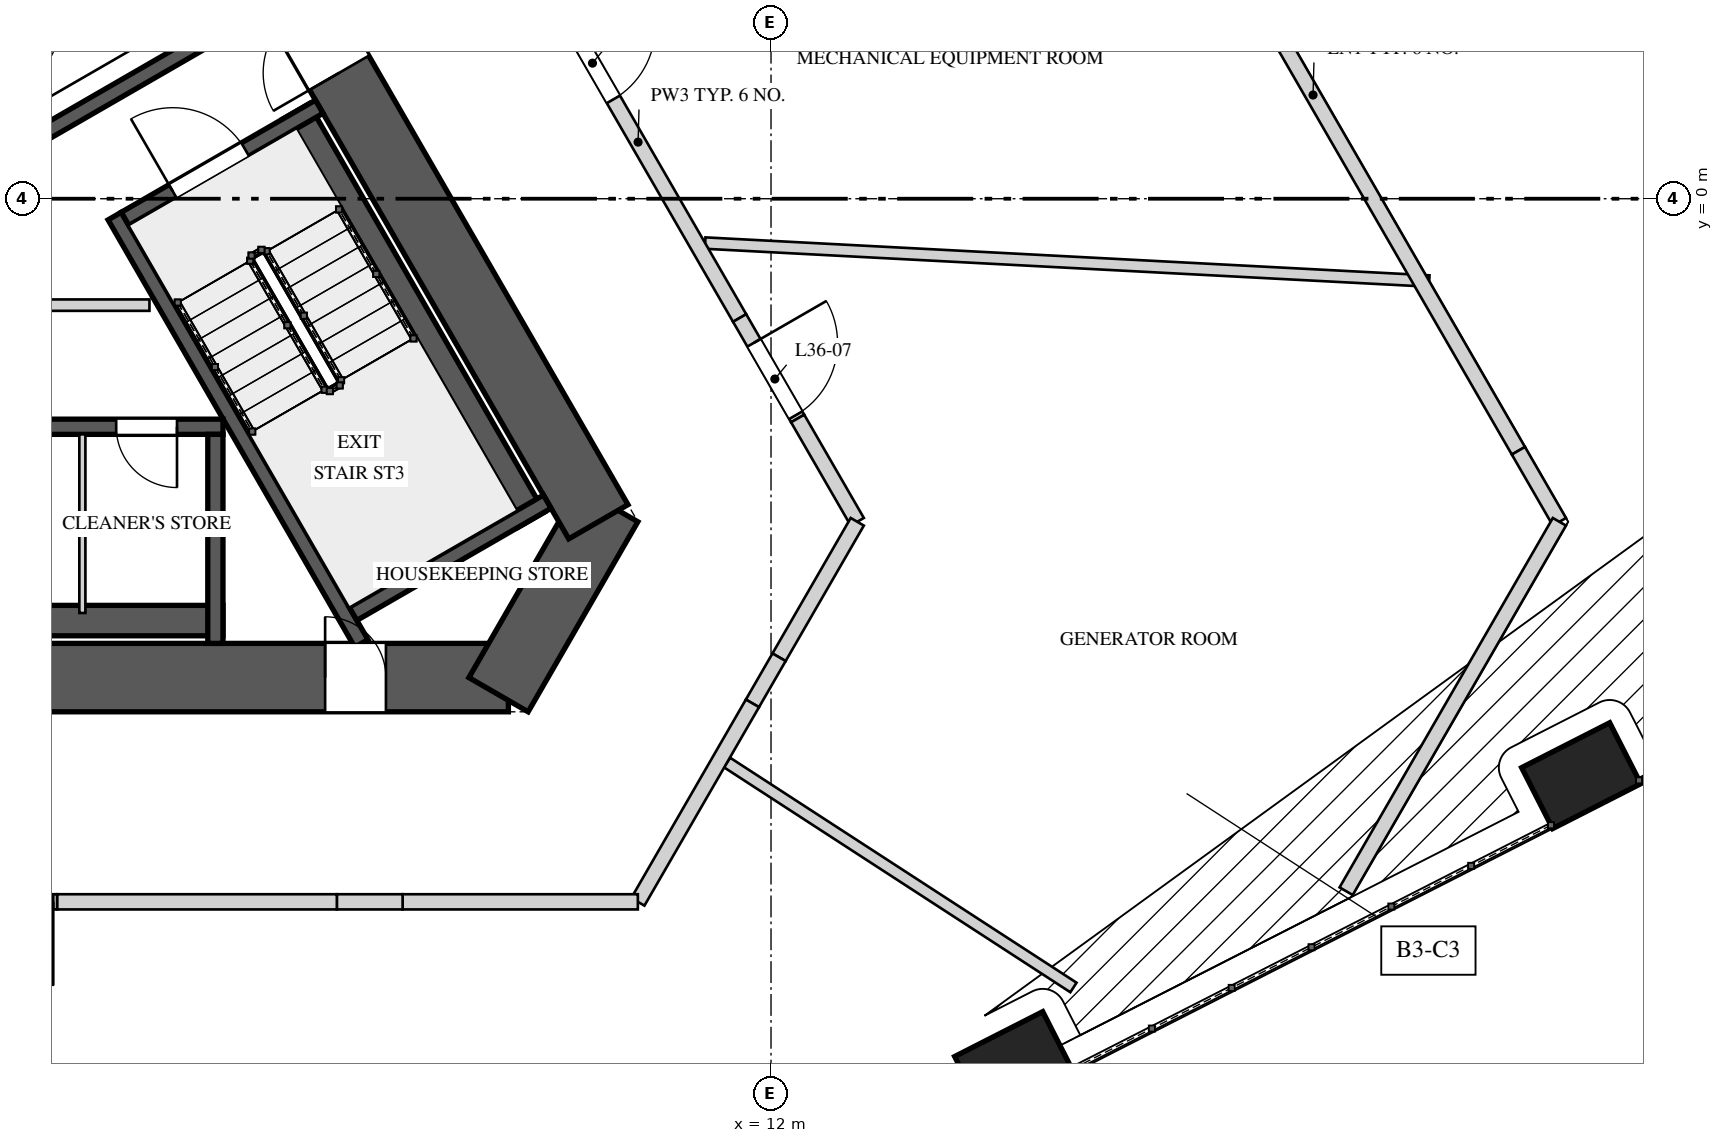
"""IFC4 building model, lengths in metres.
Left out: names, types, materials, properties, quantities, classifications, styles, units other than length and angle.
Written with IfcOpenShell. Run it as: python <this file> out.ifc"""

import sys

from ifc_helpers import new_model, si_unit, direction, frame, frame_2d, origin, origin_2d, place, context, subcontext, project, spatial, polyline, rectangle, outline, extrude, element, fill, save


model = new_model("IFC4")
c1 = context("Model", 3, precision=1e-05, world=origin(), true_north=direction((0.0, 1.0)))
c2 = subcontext(c1, "Body", "Model", "MODEL_VIEW")
j1 = project(units=[si_unit("LENGTHUNIT", "METRE"), si_unit("PLANEANGLEUNIT", "RADIAN")], contexts=[c1])
p1 = place(None, origin())
s1 = spatial("IfcSite", under=j1, at=p1, CompositionType="ELEMENT")
p2 = place(p1, origin())
s2 = spatial("IfcBuilding", under=s1, at=p2, CompositionType="ELEMENT")
p3 = place(p2, frame((0.0, 0.0, 157.6)))
s3 = spatial("IfcBuildingStorey", under=s2, at=p3, CompositionType="ELEMENT", Elevation=157.6)
p4 = place(p3, frame((-8.545, -6.3, 0.0), z_axis=(0.0, 0.0, 1.0), x_axis=(1.0, 0.0, 0.0)))
e1 = element("IfcWall", 1, at=p4, inside=s3, PredefinedType="SHEAR", context=c2, shape_type="SweptSolid", body=[
    extrude(rectangle(XDim=17.09, YDim=0.9, at=frame_2d((8.545, 0.0))), origin(), (0.0, 0.0, 1.0), 5.2),
])
p5 = place(p4, frame((6.75, 0.0, 0.0)))
e2 = element("IfcOpeningElement", 2, at=p5, cuts=e1, PredefinedType="OPENING", context=c2, shape_type="SweptSolid", body=[
    extrude(rectangle(XDim=1.0, YDim=2.4, at=frame_2d((0.5, 1.2))), frame((0.0, 0.46, 0.0), z_axis=(0.0, -1.0, 0.0), x_axis=(1.0, 0.0, 0.0)), (0.0, 0.0, 1.0), 0.92),
])
p6 = place(p4, frame((14.678, 0.0, 0.0)))
e3 = element("IfcOpeningElement", 3, at=p6, cuts=e1, PredefinedType="OPENING", context=c2, shape_type="SweptSolid", body=[
    extrude(rectangle(XDim=0.8, YDim=2.1, at=frame_2d((0.4, 1.05))), frame((0.0, 0.46, 0.0), z_axis=(0.0, -1.0, 0.0), x_axis=(1.0, 0.0, 0.0)), (0.0, 0.0, 1.0), 0.92),
])
p7 = place(p3, frame((8.415, -6.525, 0.0), z_axis=(0.0, 0.0, 1.0), x_axis=(0.500059191753, 0.865991226713, 0.0)))
e4 = element("IfcWall", 4, at=p7, inside=s3, PredefinedType="SHEAR", context=c2, shape_type="SweptSolid", body=[
    extrude(rectangle(XDim=2.887, YDim=0.9, at=frame_2d((1.443, 0.0))), origin(), (0.0, 0.0, 1.0), 5.2),
])
p8 = place(p3, frame((9.729, -4.25, 0.0), z_axis=(0.0, 0.0, 1.0), x_axis=(-0.500004814304, 0.866022624227, 0.0)))
e5 = element("IfcWall", 5, at=p8, inside=s3, PredefinedType="SHEAR", context=c2, shape_type="SweptSolid", body=[
    extrude(rectangle(XDim=17.09, YDim=0.9, at=frame_2d((8.545, 0.0))), origin(), (0.0, 0.0, 1.0), 5.2),
])
p9 = place(p8, frame((6.82, 0.0, 0.0)))
e6 = element("IfcOpeningElement", 6, at=p9, cuts=e5, PredefinedType="OPENING", context=c2, shape_type="SweptSolid", body=[
    extrude(rectangle(XDim=1.0, YDim=2.4, at=frame_2d((0.5, 1.2))), frame((0.0, 0.46, 0.0), z_axis=(0.0, -1.0, 0.0), x_axis=(1.0, 0.0, 0.0)), (0.0, 0.0, 1.0), 0.92),
])
p10 = place(p8, frame((14.184, 0.0, 0.0)))
e7 = element("IfcOpeningElement", 7, at=p10, cuts=e5, PredefinedType="OPENING", context=c2, shape_type="SweptSolid", body=[
    extrude(rectangle(XDim=0.8, YDim=2.1, at=frame_2d((0.4, 1.05))), frame((0.0, 0.46, 0.0), z_axis=(0.0, -1.0, 0.0), x_axis=(1.0, 0.0, 0.0)), (0.0, 0.0, 1.0), 0.92),
])
for number, where, z_axis, x_axis in (
    (8, (15.2, -11.391, 0.0), (0.0, 0.0, 1.0), (0.891, 0.454, 0.0)),
    (9, (22.659, -7.59, 0.0), (0.0, 0.0, 1.0), (0.891, 0.454, 0.0)),
):
    element("IfcColumn", number, at=place(p3, frame(where, z_axis=z_axis, x_axis=x_axis)), inside=s3, PredefinedType="COLUMN", context=c2, shape_type="SweptSolid", body=[
        extrude(rectangle(XDim=1.3, YDim=0.9, at=origin_2d()), origin(), (0.0, 0.0, 1.0), 2.835),
    ])
p11 = place(p3, frame((8.846, -4.222, 0.0), z_axis=(0.0, 0.0, 1.0), x_axis=(-0.500009909098, 0.866019682689, 0.0)))
e10 = element("IfcWall", 10, at=p11, inside=s3, PredefinedType="SOLIDWALL", context=c2, shape_type="SweptSolid", body=[
    extrude(rectangle(XDim=6.2, YDim=0.4, at=frame_2d((3.1, 0.0))), origin(), (0.0, 0.0, 1.0), 4.85),
])
p12 = place(p3, frame((6.611, -5.85, 0.0), z_axis=(0.0, 0.0, 1.0), x_axis=(-0.499965531574, 0.866045303225, 0.0)))
e11 = element("IfcWall", 11, at=p12, inside=s3, PredefinedType="SOLIDWALL", context=c2, shape_type="SweptSolid", body=[
    extrude(rectangle(XDim=6.492, YDim=0.2, at=frame_2d((3.246, 0.0))), origin(), (0.0, 0.0, 1.0), 4.85),
])
p13 = place(p3, frame((6.501, -5.461, 0.0), z_axis=(0.0, 0.0, 1.0), x_axis=(0.866003658127, 0.500037662692, 0.0)))
e12 = element("IfcWall", 12, at=p13, inside=s3, PredefinedType="SOLIDWALL", context=c2, shape_type="SweptSolid", body=[
    extrude(rectangle(XDim=2.95, YDim=0.2, at=frame_2d((1.475, 0.0))), origin(), (0.0, 0.0, 1.0), 4.85),
])
p14 = place(p3, frame((3.501, -0.265, 0.0), z_axis=(0.0, 0.0, 1.0), x_axis=(0.866039495442, 0.49997559174, 0.0)))
e13 = element("IfcWall", 13, at=p14, inside=s3, PredefinedType="SOLIDWALL", context=c2, shape_type="SweptSolid", body=[
    extrude(rectangle(XDim=2.95, YDim=0.2, at=frame_2d((1.475, 0.0))), origin(), (0.0, 0.0, 1.0), 4.85),
])
p15 = place(p14, frame((0.725, 0.0, 0.0)))
e14 = element("IfcOpeningElement", 14, at=p15, cuts=e13, PredefinedType="OPENING", context=c2, shape_type="SweptSolid", body=[
    extrude(rectangle(XDim=1.1, YDim=2.4, at=frame_2d((0.55, 1.2))), frame((0.0, 0.11, 0.0), z_axis=(0.0, -1.0, 0.0), x_axis=(1.0, 0.0, 0.0)), (0.0, 0.0, 1.0), 0.22),
])
p16 = place(p3, frame((4.79, -3.0, 0.0), z_axis=(0.0, 0.0, 1.0), x_axis=(-1.0, 0.0, 0.0)))
e15 = element("IfcWall", 15, at=p16, inside=s3, PredefinedType="SOLIDWALL", context=c2, shape_type="SweptSolid", body=[
    extrude(rectangle(XDim=5.5, YDim=0.2, at=frame_2d((2.75, 0.0))), origin(), (0.0, 0.0, 1.0), 4.85),
])
p17 = place(p16, frame((3.12, 0.0, 0.0)))
e16 = element("IfcOpeningElement", 16, at=p17, cuts=e15, PredefinedType="OPENING", context=c2, shape_type="SweptSolid", body=[
    extrude(rectangle(XDim=0.95, YDim=2.4, at=frame_2d((0.475, 1.2))), frame((0.0, 0.11, 0.0), z_axis=(0.0, -1.0, 0.0), x_axis=(1.0, 0.0, 0.0)), (0.0, 0.0, 1.0), 0.22),
])
p18 = place(p16, frame((0.605, 0.0, 0.0)))
e17 = element("IfcOpeningElement", 17, at=p18, cuts=e15, PredefinedType="OPENING", context=c2, shape_type="SweptSolid", body=[
    extrude(rectangle(XDim=0.8, YDim=2.1, at=frame_2d((0.4, 1.05))), frame((0.0, 0.11, 0.0), z_axis=(0.0, -1.0, 0.0), x_axis=(1.0, 0.0, 0.0)), (0.0, 0.0, 1.0), 0.22),
])
p19 = place(p3, frame((-0.71, -5.55, 0.0), z_axis=(0.0, 0.0, 1.0), x_axis=(1.0, 0.0, 0.0)))
e18 = element("IfcWall", 18, at=p19, inside=s3, PredefinedType="SOLIDWALL", context=c2, shape_type="SweptSolid", body=[
    extrude(rectangle(XDim=5.5, YDim=0.4, at=frame_2d((2.75, 0.0))), origin(), (0.0, 0.0, 1.0), 4.85),
])
p20 = place(p3, frame((4.69, -3.1, 0.0), z_axis=(0.0, 0.0, 1.0), x_axis=(0.0, -1.0, 0.0)))
e19 = element("IfcWall", 19, at=p20, inside=s3, PredefinedType="SOLIDWALL", context=c2, shape_type="SweptSolid", body=[
    extrude(rectangle(XDim=2.75, YDim=0.2, at=frame_2d((1.375, 0.0))), origin(), (0.0, 0.0, 1.0), 4.85),
])
p21 = place(p3, frame((2.94, -3.1, 0.0), z_axis=(0.0, 0.0, 1.0), x_axis=(0.0, -1.0, 0.0)))
e20 = element("IfcWall", 20, at=p21, inside=s3, PredefinedType="PARTITIONING", context=c2, shape_type="SweptSolid", body=[
    extrude(rectangle(XDim=2.35, YDim=0.08, at=frame_2d((1.175, 0.0))), origin(), (0.0, 0.0, 1.0), 4.85),
])
p22 = place(p3, frame((2.227, 0.743, 0.0), z_axis=(0.0, 0.0, 1.0), x_axis=(0.866012656725, 0.500022077904, 0.0)))
e21 = element("IfcWall", 21, at=p22, inside=s3, PredefinedType="SOLIDWALL", context=c2, shape_type="SweptSolid", body=[
    extrude(rectangle(XDim=3.55, YDim=0.2, at=frame_2d((1.775, 0.0))), origin(), (0.0, 0.0, 1.0), 4.85),
])
p23 = place(p3, frame((-4.053, -1.4, 0.0), z_axis=(0.0, 0.0, 1.0), x_axis=(1.0, 0.0, 0.0)))
e22 = element("IfcWall", 22, at=p23, inside=s3, PredefinedType="PARTITIONING", context=c2, shape_type="SweptSolid", body=[
    extrude(rectangle(XDim=7.876, YDim=0.15, at=frame_2d((3.938, 0.0))), origin(), (0.0, 0.0, 1.0), 4.85),
])
p24 = place(p3, frame((11.133, -0.583, 0.0), z_axis=(0.0, 0.0, 1.0), x_axis=(0.998629329727, -0.052339868248, 0.0)))
e23 = element("IfcWall", 23, at=p24, inside=s3, PredefinedType="PARTITIONING", context=c2, shape_type="SweptSolid", body=[
    extrude(rectangle(XDim=9.539, YDim=0.15, at=frame_2d((4.77, 0.0))), origin(), (0.0, 0.0, 1.0), 4.85),
])
p25 = place(p3, frame((11.422, -7.417, 0.0), z_axis=(0.0, 0.0, 1.0), x_axis=(0.838667328076, -0.544644023944, 0.0)))
e24 = element("IfcWall", 24, at=p25, inside=s3, PredefinedType="PARTITIONING", context=c2, shape_type="SweptSolid", body=[
    extrude(rectangle(XDim=5.434, YDim=0.15, at=frame_2d((2.717, 0.0))), origin(), (0.0, 0.0, 1.0), 4.85),
])
p26 = place(p3, frame((8.915, 3.059, 0.0), z_axis=(0.0, 0.0, 1.0), x_axis=(0.500011158634, -0.866018961248, 0.0)))
e25 = element("IfcWall", 25, at=p26, inside=s3, PredefinedType="SOLIDWALL", context=c2, shape_type="SweptSolid", body=[
    extrude(rectangle(XDim=5.344, YDim=0.2, at=frame_2d((2.672, 0.0))), origin(), (0.0, 0.0, 1.0), 4.85),
])
p27 = place(p26, frame((0.922, 0.0, 0.0)))
e26 = element("IfcOpeningElement", 26, at=p27, cuts=e25, PredefinedType="OPENING", context=c2, shape_type="SweptSolid", body=[
    extrude(rectangle(XDim=1.1, YDim=2.2, at=frame_2d((0.55, 1.1))), frame((0.0, 0.11, 0.0), z_axis=(0.0, -1.0, 0.0), x_axis=(1.0, 0.0, 0.0)), (0.0, 0.0, 1.0), 0.22),
])
p28 = place(p3, frame((11.587, -1.569, 0.0), z_axis=(0.0, 0.0, 1.0), x_axis=(0.500008507724, -0.866020491792, 0.0)))
e27 = element("IfcWall", 27, at=p28, inside=s3, PredefinedType="SOLIDWALL", context=c2, shape_type="SweptSolid", body=[
    extrude(outline(polyline([(0.0, 0.0), (1.527, 0.0), (1.527, 4.85), (1.039, 4.85), (1.039, 3.95), (0.0, 3.95), (0.0, 0.0)])), frame((0.0, 0.1, 0.0), z_axis=(0.0, -1.0, 0.0), x_axis=(1.0, 0.0, 0.0)), (0.0, 0.0, 1.0), 0.2),
])
p29 = place(p28, frame((0.377, 0.0, 0.0)))
e28 = element("IfcOpeningElement", 28, at=p29, cuts=e27, PredefinedType="OPENING", context=c2, shape_type="SweptSolid", body=[
    extrude(rectangle(XDim=1.1, YDim=2.2, at=frame_2d((0.55, 1.1))), frame((0.0, 0.11, 0.0), z_axis=(0.0, -1.0, 0.0), x_axis=(1.0, 0.0, 0.0)), (0.0, 0.0, 1.0), 0.22),
])
p30 = place(p3, frame((12.35, -2.891, 0.0), z_axis=(0.0, 0.0, 1.0), x_axis=(0.500005339912, -0.866022320763, 0.0)))
e29 = element("IfcWall", 29, at=p30, inside=s3, PredefinedType="SOLIDWALL", context=c2, shape_type="SweptSolid", body=[
    extrude(rectangle(XDim=1.569, YDim=0.2, at=frame_2d((0.784, 0.0))), origin(), (0.0, 0.0, 1.0), 4.85),
])
p31 = place(p3, frame((13.135, -4.25, 0.0), z_axis=(0.0, 0.0, 1.0), x_axis=(-0.500030520673, -0.866007781949, 0.0)))
e30 = element("IfcWall", 30, at=p31, inside=s3, PredefinedType="SOLIDWALL", context=c2, shape_type="SweptSolid", body=[
    extrude(rectangle(XDim=2.058, YDim=0.2, at=frame_2d((1.029, 0.0))), origin(), (0.0, 0.0, 1.0), 4.85),
])
p32 = place(p3, frame((12.106, -6.032, 0.0), z_axis=(0.0, 0.0, 1.0), x_axis=(-0.49996389635, -0.866046247233, 0.0)))
e31 = element("IfcWall", 31, at=p32, inside=s3, PredefinedType="SOLIDWALL", context=c2, shape_type="SweptSolid", body=[
    extrude(rectangle(XDim=0.7, YDim=0.2, at=frame_2d((0.35, 0.0))), origin(), (0.0, 0.0, 1.0), 4.15),
])
p33 = place(p3, frame((11.756, -6.639, 0.0), z_axis=(0.0, 0.0, 1.0), x_axis=(-0.499979445284, -0.86603727073, 0.0)))
e32 = element("IfcWall", 32, at=p33, inside=s3, PredefinedType="SOLIDWALL", context=c2, shape_type="SweptSolid", body=[
    extrude(rectangle(XDim=3.015, YDim=0.2, at=frame_2d((1.508, 0.0))), origin(), (0.0, 0.0, 1.0), 4.85),
])
p34 = place(p3, frame((10.248, -9.25, 0.0), z_axis=(0.0, 0.0, 1.0), x_axis=(-1.0, 0.0, 0.0)))
e33 = element("IfcWall", 33, at=p34, inside=s3, PredefinedType="SOLIDWALL", context=c2, shape_type="SweptSolid", body=[
    extrude(rectangle(XDim=3.095, YDim=0.2, at=frame_2d((1.547, 0.0))), origin(), (0.0, 0.0, 1.0), 4.85),
])
p35 = place(p3, frame((7.153, -9.25, 0.0), z_axis=(0.0, 0.0, 1.0), x_axis=(-1.0, 0.0, 0.0)))
e34 = element("IfcWall", 34, at=p35, inside=s3, PredefinedType="SOLIDWALL", context=c2, shape_type="SweptSolid", body=[
    extrude(rectangle(XDim=0.865, YDim=0.2, at=frame_2d((0.433, 0.0))), origin(), (0.0, 0.0, 1.0), 4.15),
])
p36 = place(p3, frame((6.288, -9.25, 0.0), z_axis=(0.0, 0.0, 1.0), x_axis=(-1.0, 0.0, 0.0)))
e35 = element("IfcWall", 35, at=p36, inside=s3, PredefinedType="SOLIDWALL", context=c2, shape_type="SweptSolid", body=[
    extrude(rectangle(XDim=3.681, YDim=0.2, at=frame_2d((1.84, 0.0))), origin(), (0.0, 0.0, 1.0), 4.85),
])
p37 = place(p3, frame((2.607, -9.25, 0.0), z_axis=(0.0, 0.0, 1.0), x_axis=(-1.0, 0.0, 0.0)))
e36 = element("IfcWall", 36, at=p37, inside=s3, PredefinedType="SOLIDWALL", context=c2, shape_type="SweptSolid", body=[
    extrude(outline(polyline([(0.0, 0.0), (1.337, 0.0), (1.337, 4.15), (0.626, 4.15), (0.626, 4.85), (0.0, 4.85), (0.0, 0.0)])), frame((0.0, 0.1, 0.0), z_axis=(0.0, -1.0, 0.0), x_axis=(1.0, 0.0, 0.0)), (0.0, 0.0, 1.0), 0.2),
])
p38 = place(p37, frame((0.05, 0.0, 0.0)))
e37 = element("IfcOpeningElement", 37, at=p38, cuts=e36, PredefinedType="OPENING", context=c2, shape_type="SweptSolid", body=[
    extrude(rectangle(XDim=1.1, YDim=2.2, at=frame_2d((0.55, 1.1))), frame((0.0, 0.11, 0.0), z_axis=(0.0, -1.0, 0.0), x_axis=(1.0, 0.0, 0.0)), (0.0, 0.0, 1.0), 0.22),
])
p39 = place(p3, frame((16.429, 6.044, 0.0), z_axis=(0.0, 0.0, 1.0), x_axis=(0.500009239692, -0.86602006918, 0.0)))
e38 = element("IfcWall", 38, at=p39, inside=s3, PredefinedType="SOLIDWALL", context=c2, shape_type="SweptSolid", body=[
    extrude(rectangle(XDim=10.808, YDim=0.2, at=frame_2d((5.404, 0.0))), origin(), (0.0, 0.0, 1.0), 4.85),
])
p40 = place(p3, frame((21.833, -3.315, 0.0), z_axis=(0.0, 0.0, 1.0), x_axis=(0.499983569942, -0.866034889475, 0.0)))
e39 = element("IfcWall", 39, at=p40, inside=s3, PredefinedType="SOLIDWALL", context=c2, shape_type="SweptSolid", body=[
    extrude(rectangle(XDim=1.079, YDim=0.2, at=frame_2d((0.54, 0.0))), origin(), (0.0, 0.0, 1.0), 3.95),
])
p41 = place(p3, frame((22.372, -4.25, 0.0), z_axis=(0.0, 0.0, 1.0), x_axis=(-0.500008664361, -0.866020401355, 0.0)))
e40 = element("IfcWall", 40, at=p41, inside=s3, PredefinedType="SOLIDWALL", context=c2, shape_type="SweptSolid", body=[
    extrude(rectangle(XDim=5.612, YDim=0.2, at=frame_2d((2.806, 0.0))), origin(), (0.0, 0.0, 1.0), 4.85),
])
p42 = place(p15, origin())
e41 = element("IfcDoor", 41, at=p42, inside=s3, OperationType="SINGLE_SWING_RIGHT", PredefinedType="DOOR", context=c2, shape_type="SweptSolid", body=[
    extrude(rectangle(XDim=1.1, YDim=2.4, at=frame_2d((0.55, 1.2))), frame((0.0, 0.025, 0.0), z_axis=(0.0, -1.0, 0.0), x_axis=(1.0, 0.0, 0.0)), (0.0, 0.0, 1.0), 0.05),
])
fill(e14, e41)
p43 = place(p18, origin())
e42 = element("IfcDoor", 42, at=p43, inside=s3, OperationType="SINGLE_SWING_RIGHT", PredefinedType="DOOR", context=c2, shape_type="SweptSolid", body=[
    extrude(rectangle(XDim=0.8, YDim=2.1, at=frame_2d((0.4, 1.05))), frame((0.0, 0.025, 0.0), z_axis=(0.0, -1.0, 0.0), x_axis=(1.0, 0.0, 0.0)), (0.0, 0.0, 1.0), 0.05),
])
fill(e17, e42)
p44 = place(p9, origin())
e43 = element("IfcDoor", 43, at=p44, inside=s3, OperationType="SINGLE_SWING_RIGHT", PredefinedType="DOOR", context=c2, shape_type="SweptSolid", body=[
    extrude(rectangle(XDim=1.0, YDim=2.4, at=frame_2d((0.5, 1.2))), frame((0.0, 0.025, 0.0), z_axis=(0.0, -1.0, 0.0), x_axis=(1.0, 0.0, 0.0)), (0.0, 0.0, 1.0), 0.05),
])
fill(e6, e43)
p45 = place(p6, origin())
e44 = element("IfcDoor", 44, at=p45, inside=s3, OperationType="SINGLE_SWING_LEFT", PredefinedType="DOOR", context=c2, shape_type="SweptSolid", body=[
    extrude(rectangle(XDim=0.8, YDim=2.1, at=frame_2d((0.4, 1.05))), frame((0.0, 0.025, 0.0), z_axis=(0.0, -1.0, 0.0), x_axis=(1.0, 0.0, 0.0)), (0.0, 0.0, 1.0), 0.05),
])
fill(e3, e44)
p46 = place(p38, origin())
e45 = element("IfcDoor", 45, at=p46, inside=s3, OperationType="SINGLE_SWING_RIGHT", PredefinedType="DOOR", context=c2, shape_type="SweptSolid", body=[
    extrude(rectangle(XDim=1.1, YDim=2.2, at=frame_2d((0.55, 1.1))), frame((0.0, 0.025, 0.0), z_axis=(0.0, -1.0, 0.0), x_axis=(1.0, 0.0, 0.0)), (0.0, 0.0, 1.0), 0.05),
])
fill(e37, e45)
p47 = place(p29, origin())
e46 = element("IfcDoor", 46, at=p47, inside=s3, OperationType="SINGLE_SWING_LEFT", PredefinedType="DOOR", context=c2, shape_type="SweptSolid", body=[
    extrude(rectangle(XDim=1.1, YDim=2.2, at=frame_2d((0.55, 1.1))), frame((0.0, 0.025, 0.0), z_axis=(0.0, -1.0, 0.0), x_axis=(1.0, 0.0, 0.0)), (0.0, 0.0, 1.0), 0.05),
])
fill(e28, e46)
p48 = place(p27, origin())
e47 = element("IfcDoor", 47, at=p48, inside=s3, OperationType="SINGLE_SWING_RIGHT", PredefinedType="DOOR", context=c2, shape_type="SweptSolid", body=[
    extrude(rectangle(XDim=1.1, YDim=2.2, at=frame_2d((0.55, 1.1))), frame((0.0, 0.025, 0.0), z_axis=(0.0, -1.0, 0.0), x_axis=(1.0, 0.0, 0.0)), (0.0, 0.0, 1.0), 0.05),
])
fill(e26, e47)
save(model, sys.argv[1])
